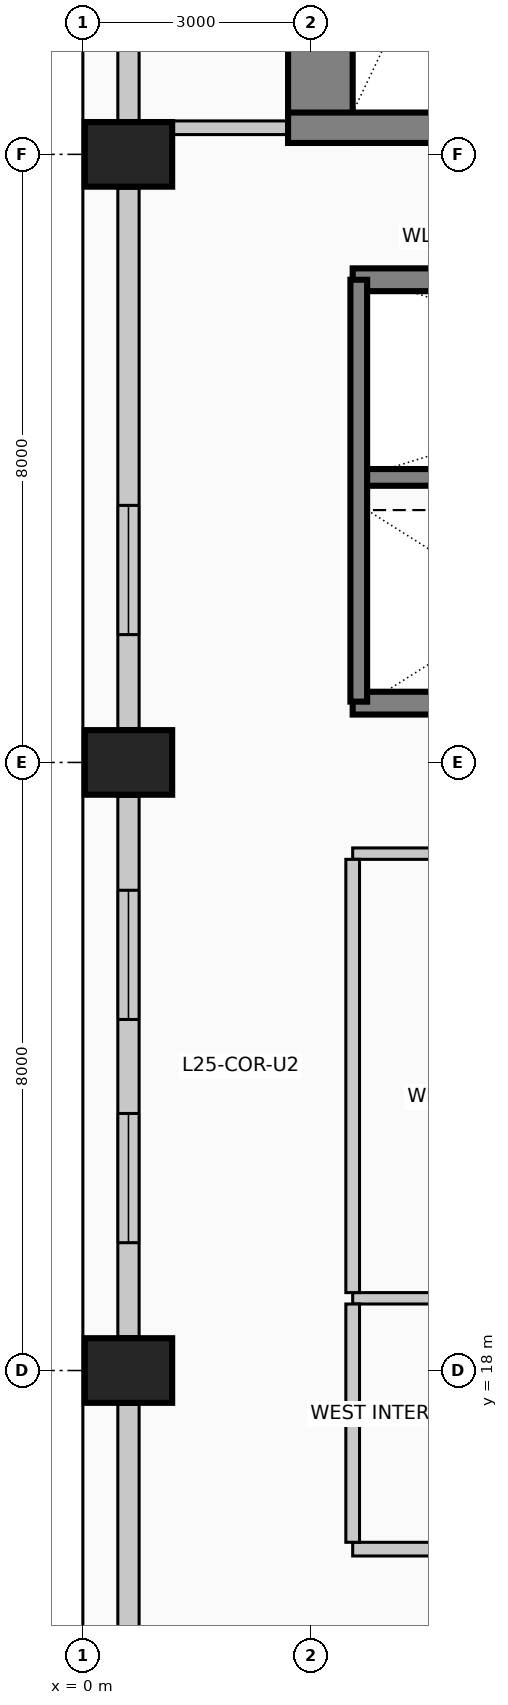
"""IFC4 building model, lengths in metres.
Left out: names, types, materials, properties, quantities, classifications, styles, units other than length and angle.
Written with IfcOpenShell. Run it as: python <this file> out.ifc"""

import sys

from ifc_helpers import new_model, si_unit, direction, frame, frame_2d, origin, origin_2d, place, context, subcontext, project, spatial, rectangle, extrude, element, fill, save


model = new_model("IFC4")
c1 = context("Model", 3, precision=1e-05, world=origin(), true_north=direction((0.0, 1.0)))
c2 = subcontext(c1, "Body", "Model", "MODEL_VIEW")
j1 = project(units=[si_unit("LENGTHUNIT", "METRE"), si_unit("PLANEANGLEUNIT", "RADIAN")], contexts=[c1])
p1 = place(None, origin())
s1 = spatial("IfcSite", under=j1, at=p1, CompositionType="ELEMENT")
p2 = place(p1, origin())
s2 = spatial("IfcBuilding", under=s1, at=p2, CompositionType="ELEMENT")
p3 = place(p2, frame((0.0, 0.0, 104.6)))
s3 = spatial("IfcBuildingStorey", under=s2, at=p3, CompositionType="ELEMENT", Elevation=104.6)
p4 = place(p3, frame((3.125, 34.15, 0.0), z_axis=(0.0, 0.0, 1.0), x_axis=(0.0, 1.0, 0.0)))
e1 = element("IfcWall", 1, at=p4, inside=s3, PredefinedType="SHEAR", context=c2, shape_type="SweptSolid", body=[
    extrude(rectangle(XDim=9.13, YDim=0.85, at=frame_2d((4.565, 0.0))), origin(), (0.0, 0.0, 1.0), 4.0),
])
p5 = place(p3, frame((2.7, 34.35, 0.0), z_axis=(0.0, 0.0, 1.0), x_axis=(1.0, 0.0, 0.0)))
e2 = element("IfcWall", 2, at=p5, inside=s3, PredefinedType="SHEAR", context=c2, shape_type="SweptSolid", body=[
    extrude(rectangle(XDim=5.01, YDim=0.4, at=frame_2d((2.505, 0.0))), origin(), (0.0, 0.0, 1.0), 4.0),
])
p6 = place(p5, frame((2.4, 0.0, 0.0)))
e3 = element("IfcOpeningElement", 3, at=p6, cuts=e2, PredefinedType="OPENING", context=c2, shape_type="SweptSolid", body=[
    extrude(rectangle(XDim=1.15, YDim=2.2, at=frame_2d((0.575, 1.1))), frame((0.0, 0.21, 0.0), z_axis=(0.0, -1.0, 0.0), x_axis=(1.0, 0.0, 0.0)), (0.0, 0.0, 1.0), 0.42),
])
for number, where, z_axis, x_axis in (
    (4, (0.6, 18.0, 0.0), (0.0, 0.0, 1.0), (0.0, 1.0, 0.0)),
    (5, (0.6, 26.0, 0.0), (0.0, 0.0, 1.0), (0.0, 1.0, 0.0)),
    (6, (0.6, 34.0, 0.0), (0.0, 0.0, 1.0), (0.0, 1.0, 0.0)),
):
    element("IfcColumn", number, at=place(p3, frame(where, z_axis=z_axis, x_axis=x_axis)), inside=s3, PredefinedType="COLUMN", context=c2, shape_type="SweptSolid", body=[
        extrude(rectangle(XDim=0.85, YDim=1.15, at=origin_2d()), origin(), (0.0, 0.0, 1.0), 4.0),
    ])
p7 = place(p3, frame((0.6, 10.445, 0.0), z_axis=(0.0, 0.0, 1.0), x_axis=(0.0, 1.0, 0.0)))
e7 = element("IfcWall", 7, at=p7, inside=s3, PredefinedType="SOLIDWALL", context=c2, shape_type="SweptSolid", body=[
    extrude(rectangle(XDim=7.11, YDim=0.28, at=frame_2d((3.555, 0.0))), origin(), (0.0, 0.0, 1.0), 2.875),
])
p8 = place(p3, frame((0.6, 18.445, 0.0), z_axis=(0.0, 0.0, 1.0), x_axis=(0.0, 1.0, 0.0)))
e8 = element("IfcWall", 8, at=p8, inside=s3, PredefinedType="SOLIDWALL", context=c2, shape_type="SweptSolid", body=[
    extrude(rectangle(XDim=7.11, YDim=0.28, at=frame_2d((3.555, 0.0))), origin(), (0.0, 0.0, 1.0), 2.875),
])
p9 = place(p8, frame((1.237, 0.0, 0.5)))
e9 = element("IfcOpeningElement", 9, at=p9, cuts=e8, PredefinedType="OPENING", context=c2, shape_type="SweptSolid", body=[
    extrude(rectangle(XDim=1.7, YDim=1.95, at=frame_2d((0.85, 0.975))), frame((0.0, 0.15, 0.0), z_axis=(0.0, -1.0, 0.0), x_axis=(1.0, 0.0, 0.0)), (0.0, 0.0, 1.0), 0.3),
])
p10 = place(p8, frame((4.173, 0.0, 0.5)))
e10 = element("IfcOpeningElement", 10, at=p10, cuts=e8, PredefinedType="OPENING", context=c2, shape_type="SweptSolid", body=[
    extrude(rectangle(XDim=1.7, YDim=1.95, at=frame_2d((0.85, 0.975))), frame((0.0, 0.15, 0.0), z_axis=(0.0, -1.0, 0.0), x_axis=(1.0, 0.0, 0.0)), (0.0, 0.0, 1.0), 0.3),
])
p11 = place(p3, frame((0.6, 26.445, 0.0), z_axis=(0.0, 0.0, 1.0), x_axis=(0.0, 1.0, 0.0)))
e11 = element("IfcWall", 11, at=p11, inside=s3, PredefinedType="SOLIDWALL", context=c2, shape_type="SweptSolid", body=[
    extrude(rectangle(XDim=7.11, YDim=0.28, at=frame_2d((3.555, 0.0))), origin(), (0.0, 0.0, 1.0), 2.875),
])
p12 = place(p11, frame((1.237, 0.0, 0.5)))
e12 = element("IfcOpeningElement", 12, at=p12, cuts=e11, PredefinedType="OPENING", context=c2, shape_type="SweptSolid", body=[
    extrude(rectangle(XDim=1.7, YDim=1.95, at=frame_2d((0.85, 0.975))), frame((0.0, 0.15, 0.0), z_axis=(0.0, -1.0, 0.0), x_axis=(1.0, 0.0, 0.0)), (0.0, 0.0, 1.0), 0.3),
])
p13 = place(p3, frame((0.6, 34.445, 0.0), z_axis=(0.0, 0.0, 1.0), x_axis=(0.0, 1.0, 0.0)))
e13 = element("IfcWall", 13, at=p13, inside=s3, PredefinedType="SOLIDWALL", context=c2, shape_type="SweptSolid", body=[
    extrude(rectangle(XDim=7.51, YDim=0.28, at=frame_2d((3.755, 0.0))), origin(), (0.0, 0.0, 1.0), 2.875),
])
for number, where, z_axis, x_axis in (
    (14, (3.55, 32.35, 0.0), (0.0, 0.0, 1.0), (1.0, 0.0, 0.0)),
    (15, (5.65, 26.78, 0.0), (0.0, 0.0, 1.0), (-1.0, 0.0, 0.0)),
):
    element("IfcWall", number, at=place(p3, frame(where, z_axis=z_axis, x_axis=x_axis)), inside=s3, PredefinedType="SOLIDWALL", context=c2, shape_type="SweptSolid", body=[
        extrude(rectangle(XDim=2.1, YDim=0.3, at=frame_2d((1.05, 0.0))), origin(), (0.0, 0.0, 1.0), 4.0),
    ])
p14 = place(p3, frame((3.55, 29.75, 0.0), z_axis=(0.0, 0.0, 1.0), x_axis=(1.0, 0.0, 0.0)))
e16 = element("IfcWall", 16, at=p14, inside=s3, PredefinedType="SOLIDWALL", context=c2, shape_type="SweptSolid", body=[
    extrude(rectangle(XDim=8.65, YDim=0.22, at=frame_2d((4.325, 0.0))), origin(), (0.0, 0.0, 1.0), 4.0),
])
p15 = place(p3, frame((3.63, 26.8, 0.0), z_axis=(0.0, 0.0, 1.0), x_axis=(0.0, 1.0, 0.0)))
e17 = element("IfcWall", 17, at=p15, inside=s3, PredefinedType="SOLIDWALL", context=c2, shape_type="SweptSolid", body=[
    extrude(rectangle(XDim=5.55, YDim=0.22, at=frame_2d((2.775, 0.0))), origin(), (0.0, 0.0, 1.0), 4.0),
])
p16 = place(p3, frame((3.55, 15.65, 0.0), z_axis=(0.0, 0.0, 1.0), x_axis=(1.0, 0.0, 0.0)))
e18 = element("IfcWall", 18, at=p16, inside=s3, PredefinedType="PARTITIONING", context=c2, shape_type="SweptSolid", body=[
    extrude(rectangle(XDim=5.65, YDim=0.18, at=frame_2d((2.825, 0.0))), origin(), (0.0, 0.0, 1.0), 3.725),
])
p17 = place(p16, frame((2.35, 0.0, 0.0)))
e19 = element("IfcOpeningElement", 19, at=p17, cuts=e18, PredefinedType="OPENING", context=c2, shape_type="SweptSolid", body=[
    extrude(rectangle(XDim=0.95, YDim=2.15, at=frame_2d((0.475, 1.075))), frame((0.0, 0.1, 0.0), z_axis=(0.0, -1.0, 0.0), x_axis=(1.0, 0.0, 0.0)), (0.0, 0.0, 1.0), 0.2),
])
p18 = place(p3, frame((3.55, 18.95, 0.0), z_axis=(0.0, 0.0, 1.0), x_axis=(1.0, 0.0, 0.0)))
e20 = element("IfcWall", 20, at=p18, inside=s3, PredefinedType="PARTITIONING", context=c2, shape_type="SweptSolid", body=[
    extrude(rectangle(XDim=5.65, YDim=0.15, at=frame_2d((2.825, 0.0))), origin(), (0.0, 0.0, 1.0), 3.725),
])
p19 = place(p3, frame((3.55, 24.8, 0.0), z_axis=(0.0, 0.0, 1.0), x_axis=(1.0, 0.0, 0.0)))
e21 = element("IfcWall", 21, at=p19, inside=s3, PredefinedType="PARTITIONING", context=c2, shape_type="SweptSolid", body=[
    extrude(rectangle(XDim=6.25, YDim=0.15, at=frame_2d((3.125, 0.0))), origin(), (0.0, 0.0, 1.0), 3.725),
])
p20 = place(p19, frame((2.6, 0.0, 0.0)))
e22 = element("IfcOpeningElement", 22, at=p20, cuts=e21, PredefinedType="OPENING", context=c2, shape_type="SweptSolid", body=[
    extrude(rectangle(XDim=1.05, YDim=2.15, at=frame_2d((0.525, 1.075))), frame((0.0, 0.085, 0.0), z_axis=(0.0, -1.0, 0.0), x_axis=(1.0, 0.0, 0.0)), (0.0, 0.0, 1.0), 0.17),
])
p21 = place(p3, frame((1.175, 34.35, 0.0), z_axis=(0.0, 0.0, 1.0), x_axis=(1.0, 0.0, 0.0)))
e23 = element("IfcWall", 23, at=p21, inside=s3, PredefinedType="PARTITIONING", context=c2, shape_type="SweptSolid", body=[
    extrude(rectangle(XDim=1.525, YDim=0.18, at=frame_2d((0.762, 0.0))), origin(), (0.0, 0.0, 1.0), 3.725),
])
p22 = place(p3, frame((3.55, 15.74, 0.0), z_axis=(0.0, 0.0, 1.0), x_axis=(0.0, 1.0, 0.0)))
e24 = element("IfcWall", 24, at=p22, inside=s3, PredefinedType="PARTITIONING", context=c2, shape_type="SweptSolid", body=[
    extrude(rectangle(XDim=3.135, YDim=0.18, at=frame_2d((1.567, 0.0))), origin(), (0.0, 0.0, 1.0), 3.725),
])
p23 = place(p3, frame((3.55, 19.025, 0.0), z_axis=(0.0, 0.0, 1.0), x_axis=(0.0, 1.0, 0.0)))
e25 = element("IfcWall", 25, at=p23, inside=s3, PredefinedType="PARTITIONING", context=c2, shape_type="SweptSolid", body=[
    extrude(rectangle(XDim=5.7, YDim=0.18, at=frame_2d((2.85, 0.0))), origin(), (0.0, 0.0, 1.0), 3.725),
])
p24 = place(p9, origin())
e26 = element("IfcWindow", 26, at=p24, inside=s3, PartitioningType="SINGLE_PANEL", PredefinedType="WINDOW", context=c2, shape_type="SweptSolid", body=[
    extrude(rectangle(XDim=1.7, YDim=1.95, at=frame_2d((0.85, 0.975))), frame((0.0, 0.03, 0.0), z_axis=(0.0, -1.0, 0.0), x_axis=(1.0, 0.0, 0.0)), (0.0, 0.0, 1.0), 0.06),
])
fill(e9, e26)
p25 = place(p10, origin())
e27 = element("IfcWindow", 27, at=p25, inside=s3, PartitioningType="SINGLE_PANEL", PredefinedType="WINDOW", context=c2, shape_type="SweptSolid", body=[
    extrude(rectangle(XDim=1.7, YDim=1.95, at=frame_2d((0.85, 0.975))), frame((0.0, 0.03, 0.0), z_axis=(0.0, -1.0, 0.0), x_axis=(1.0, 0.0, 0.0)), (0.0, 0.0, 1.0), 0.06),
])
fill(e10, e27)
p26 = place(p12, origin())
e28 = element("IfcWindow", 28, at=p26, inside=s3, PartitioningType="SINGLE_PANEL", PredefinedType="WINDOW", context=c2, shape_type="SweptSolid", body=[
    extrude(rectangle(XDim=1.7, YDim=1.95, at=frame_2d((0.85, 0.975))), frame((0.0, 0.03, 0.0), z_axis=(0.0, -1.0, 0.0), x_axis=(1.0, 0.0, 0.0)), (0.0, 0.0, 1.0), 0.06),
])
fill(e12, e28)
save(model, sys.argv[1])
